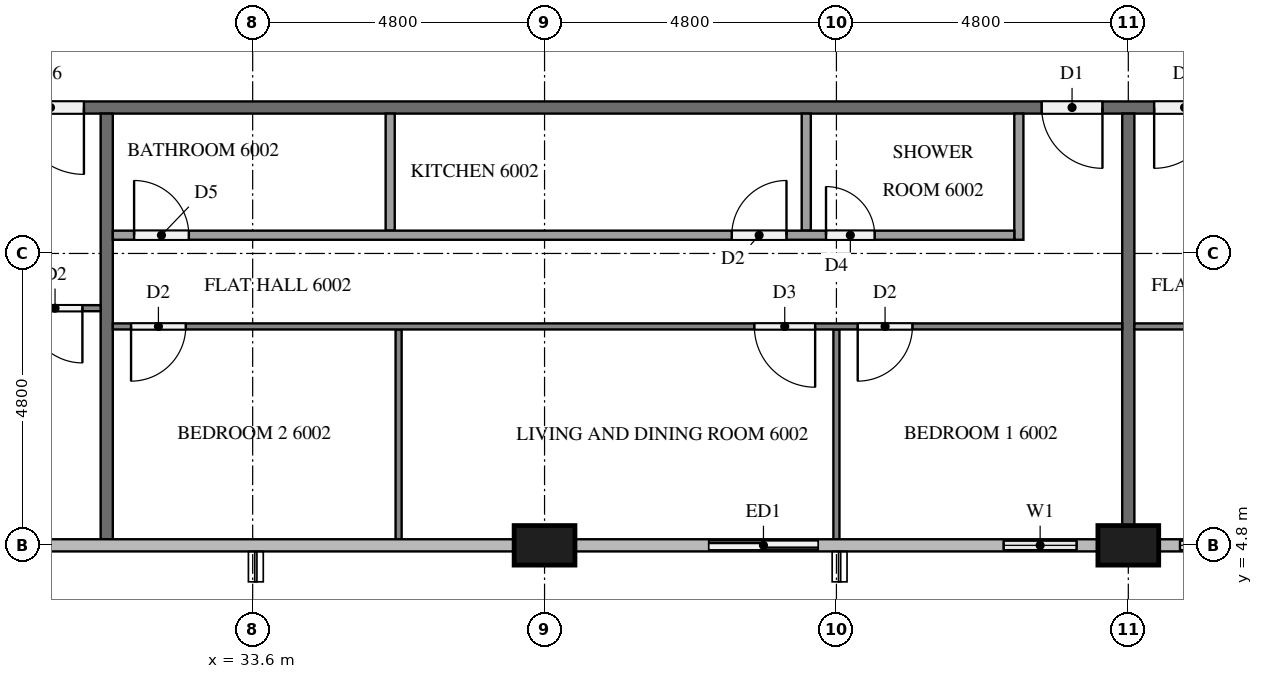
"""IFC4 building model, lengths in metres.
Left out: names, types, materials, properties, quantities, classifications, styles, units other than length and angle.
Written with IfcOpenShell. Run it as: python <this file> out.ifc"""

import sys

from ifc_helpers import new_model, si_unit, direction, frame, frame_2d, origin, origin_2d, place, context, subcontext, project, spatial, rectangle, extrude, element, fill, save


model = new_model("IFC4")
c1 = context("Model", 3, precision=1e-05, world=origin(), true_north=direction((0.0, 1.0)))
c2 = subcontext(c1, "Body", "Model", "MODEL_VIEW")
j1 = project(units=[si_unit("LENGTHUNIT", "METRE"), si_unit("PLANEANGLEUNIT", "RADIAN")], contexts=[c1])
p1 = place(None, origin())
s1 = spatial("IfcSite", under=j1, at=p1, CompositionType="ELEMENT")
p2 = place(p1, origin())
s2 = spatial("IfcBuilding", under=s1, at=p2, CompositionType="ELEMENT")
p3 = place(p2, frame((0.0, 0.0, 229.8)))
s3 = spatial("IfcBuildingStorey", under=s2, at=p3, CompositionType="ELEMENT", Elevation=229.8)
for number, where, z_axis, x_axis in (
    (1, (38.4, 4.8, 0.0), (0.0, 0.0, 1.0), (1.0, 0.0, 0.0)),
    (2, (48.0, 4.8, 0.0), (0.0, 0.0, 1.0), (1.0, 0.0, 0.0)),
):
    element("IfcColumn", number, at=place(p3, frame(where, z_axis=z_axis, x_axis=x_axis)), inside=s3, PredefinedType="COLUMN", context=c2, shape_type="SweptSolid", body=[
        extrude(rectangle(XDim=1.0, YDim=0.65, at=origin_2d()), origin(), (0.0, 0.0, 1.0), 3.1),
    ])
p4 = place(p3, frame((40.8, 4.8, 0.0), z_axis=(0.0, 0.0, 1.0), x_axis=(1.0, 0.0, 0.0)))
e3 = element("IfcWall", 3, at=p4, inside=s3, PredefinedType="SOLIDWALL", context=c2, shape_type="SweptSolid", body=[
    extrude(rectangle(XDim=2.4, YDim=0.15, at=frame_2d((1.2, 0.0))), origin(), (0.0, 0.0, 1.0), 3.1),
])
p5 = place(p4, frame((0.3, 0.0, 0.0)))
e4 = element("IfcOpeningElement", 4, at=p5, cuts=e3, PredefinedType="OPENING", context=c2, shape_type="SweptSolid", body=[
    extrude(rectangle(XDim=1.8, YDim=2.4, at=frame_2d((0.9, 1.2))), frame((0.0, 0.085, 0.0), z_axis=(0.0, -1.0, 0.0), x_axis=(1.0, 0.0, 0.0)), (0.0, 0.0, 1.0), 0.17),
])
p6 = place(p3, frame((45.6, 4.8, 0.0), z_axis=(0.0, 0.0, 1.0), x_axis=(1.0, 0.0, 0.0)))
e5 = element("IfcWall", 5, at=p6, inside=s3, PredefinedType="SOLIDWALL", context=c2, shape_type="SweptSolid", body=[
    extrude(rectangle(XDim=1.9, YDim=0.15, at=frame_2d((0.95, 0.0))), origin(), (0.0, 0.0, 1.0), 3.1),
])
p7 = place(p6, frame((0.35, 0.0, 0.9)))
e6 = element("IfcOpeningElement", 6, at=p7, cuts=e5, PredefinedType="OPENING", context=c2, shape_type="SweptSolid", body=[
    extrude(rectangle(XDim=1.2, YDim=1.4, at=frame_2d((0.6, 0.7))), frame((0.0, 0.085, 0.0), z_axis=(0.0, -1.0, 0.0), x_axis=(1.0, 0.0, 0.0)), (0.0, 0.0, 1.0), 0.17),
])
p8 = place(p3, frame((48.5, 4.8, 0.0), z_axis=(0.0, 0.0, 1.0), x_axis=(1.0, 0.0, 0.0)))
e7 = element("IfcWall", 7, at=p8, inside=s3, PredefinedType="SOLIDWALL", context=c2, shape_type="SweptSolid", body=[
    extrude(rectangle(XDim=1.9, YDim=0.15, at=frame_2d((0.95, 0.0))), origin(), (0.0, 0.0, 1.0), 3.1),
])
p9 = place(p8, frame((0.35, 0.0, 0.9)))
e8 = element("IfcOpeningElement", 8, at=p9, cuts=e7, PredefinedType="OPENING", context=c2, shape_type="SweptSolid", body=[
    extrude(rectangle(XDim=1.2, YDim=1.4, at=frame_2d((0.6, 0.7))), frame((0.0, 0.085, 0.0), z_axis=(0.0, -1.0, 0.0), x_axis=(1.0, 0.0, 0.0)), (0.0, 0.0, 1.0), 0.17),
])
p10 = place(p3, frame((50.5, 12.0, 0.0), z_axis=(0.0, 0.0, 1.0), x_axis=(-1.0, 0.0, 0.0)))
e9 = element("IfcWall", 9, at=p10, inside=s3, PredefinedType="PARTITIONING", context=c2, shape_type="SweptSolid", body=[
    extrude(rectangle(XDim=38.6, YDim=0.2, at=frame_2d((19.3, 0.0))), origin(), (0.0, 0.0, 1.0), 3.1),
])
p11 = place(p10, frame((19.675, 0.0, 0.0)))
e10 = element("IfcOpeningElement", 10, at=p11, cuts=e9, PredefinedType="OPENING", context=c2, shape_type="SweptSolid", body=[
    extrude(rectangle(XDim=1.1, YDim=2.1, at=frame_2d((0.55, 1.05))), frame((0.0, 0.11, 0.0), z_axis=(0.0, -1.0, 0.0), x_axis=(1.0, 0.0, 0.0)), (0.0, 0.0, 1.0), 0.22),
])
p12 = place(p10, frame((2.925, 0.0, 0.0)))
e11 = element("IfcOpeningElement", 11, at=p12, cuts=e9, PredefinedType="OPENING", context=c2, shape_type="SweptSolid", body=[
    extrude(rectangle(XDim=1.0, YDim=2.1, at=frame_2d((0.5, 1.05))), frame((0.0, 0.11, 0.0), z_axis=(0.0, -1.0, 0.0), x_axis=(1.0, 0.0, 0.0)), (0.0, 0.0, 1.0), 0.22),
])
p13 = place(p10, frame((1.075, 0.0, 0.0)))
e12 = element("IfcOpeningElement", 12, at=p13, cuts=e9, PredefinedType="OPENING", context=c2, shape_type="SweptSolid", body=[
    extrude(rectangle(XDim=1.0, YDim=2.1, at=frame_2d((0.5, 1.05))), frame((0.0, 0.11, 0.0), z_axis=(0.0, -1.0, 0.0), x_axis=(1.0, 0.0, 0.0)), (0.0, 0.0, 1.0), 0.22),
])
p14 = place(p3, frame((31.2, 11.9, 0.0), z_axis=(0.0, 0.0, 1.0), x_axis=(0.0, -1.0, 0.0)))
e13 = element("IfcWall", 13, at=p14, inside=s3, PredefinedType="PARTITIONING", context=c2, shape_type="SweptSolid", body=[
    extrude(rectangle(XDim=7.0, YDim=0.2, at=frame_2d((3.5, 0.0))), origin(), (0.0, 0.0, 1.0), 3.1),
])
p15 = place(p3, frame((48.0, 11.9, 0.0), z_axis=(0.0, 0.0, 1.0), x_axis=(0.0, -1.0, 0.0)))
e14 = element("IfcWall", 14, at=p15, inside=s3, PredefinedType="PARTITIONING", context=c2, shape_type="SweptSolid", body=[
    extrude(rectangle(XDim=6.775, YDim=0.2, at=frame_2d((3.387, 0.0))), origin(), (0.0, 0.0, 1.0), 3.1),
])
p16 = place(p3, frame((31.1, 8.7, 0.0), z_axis=(0.0, 0.0, 1.0), x_axis=(-1.0, 0.0, 0.0)))
e15 = element("IfcWall", 15, at=p16, inside=s3, PredefinedType="PARTITIONING", context=c2, shape_type="SweptSolid", body=[
    extrude(rectangle(XDim=19.0, YDim=0.1, at=frame_2d((9.5, 0.0))), origin(), (0.0, 0.0, 1.0), 3.1),
])
p17 = place(p16, frame((0.3, 0.0, 0.0)))
e16 = element("IfcOpeningElement", 16, at=p17, cuts=e15, PredefinedType="OPENING", context=c2, shape_type="SweptSolid", body=[
    extrude(rectangle(XDim=0.9, YDim=2.1, at=frame_2d((0.45, 1.05))), frame((0.0, 0.06, 0.0), z_axis=(0.0, -1.0, 0.0), x_axis=(1.0, 0.0, 0.0)), (0.0, 0.0, 1.0), 0.12),
])
p18 = place(p16, frame((8.25, 0.0, 0.0)))
e17 = element("IfcOpeningElement", 17, at=p18, cuts=e15, PredefinedType="OPENING", context=c2, shape_type="SweptSolid", body=[
    extrude(rectangle(XDim=0.9, YDim=2.1, at=frame_2d((0.45, 1.05))), frame((0.0, 0.06, 0.0), z_axis=(0.0, -1.0, 0.0), x_axis=(1.0, 0.0, 0.0)), (0.0, 0.0, 1.0), 0.12),
])
p19 = place(p16, frame((9.85, 0.0, 0.0)))
e18 = element("IfcOpeningElement", 18, at=p19, cuts=e15, PredefinedType="OPENING", context=c2, shape_type="SweptSolid", body=[
    extrude(rectangle(XDim=1.0, YDim=2.1, at=frame_2d((0.5, 1.05))), frame((0.0, 0.06, 0.0), z_axis=(0.0, -1.0, 0.0), x_axis=(1.0, 0.0, 0.0)), (0.0, 0.0, 1.0), 0.12),
])
p20 = place(p16, frame((17.8, 0.0, 0.0)))
e19 = element("IfcOpeningElement", 19, at=p20, cuts=e15, PredefinedType="OPENING", context=c2, shape_type="SweptSolid", body=[
    extrude(rectangle(XDim=0.9, YDim=2.1, at=frame_2d((0.45, 1.05))), frame((0.0, 0.06, 0.0), z_axis=(0.0, -1.0, 0.0), x_axis=(1.0, 0.0, 0.0)), (0.0, 0.0, 1.0), 0.12),
])
for number, where, z_axis, x_axis in (
    (20, (43.2, 8.35, 0.0), (0.0, 0.0, 1.0), (0.0, -1.0, 0.0)),
    (21, (36.0, 8.35, 0.0), (0.0, 0.0, 1.0), (0.0, -1.0, 0.0)),
):
    element("IfcWall", number, at=place(p3, frame(where, z_axis=z_axis, x_axis=x_axis)), inside=s3, PredefinedType="PARTITIONING", context=c2, shape_type="SweptSolid", body=[
        extrude(rectangle(XDim=3.45, YDim=0.1, at=frame_2d((1.725, 0.0))), origin(), (0.0, 0.0, 1.0), 3.1),
    ])
p21 = place(p3, frame((47.9, 8.4, 0.0), z_axis=(0.0, 0.0, 1.0), x_axis=(-1.0, 0.0, 0.0)))
e22 = element("IfcWall", 22, at=p21, inside=s3, PredefinedType="PARTITIONING", context=c2, shape_type="SweptSolid", body=[
    extrude(rectangle(XDim=16.6, YDim=0.1, at=frame_2d((8.3, 0.0))), origin(), (0.0, 0.0, 1.0), 3.1),
])
p22 = place(p21, frame((3.45, 0.0, 0.0)))
e23 = element("IfcOpeningElement", 23, at=p22, cuts=e22, PredefinedType="OPENING", context=c2, shape_type="SweptSolid", body=[
    extrude(rectangle(XDim=0.9, YDim=2.1, at=frame_2d((0.45, 1.05))), frame((0.0, 0.06, 0.0), z_axis=(0.0, -1.0, 0.0), x_axis=(1.0, 0.0, 0.0)), (0.0, 0.0, 1.0), 0.12),
])
p23 = place(p21, frame((5.05, 0.0, 0.0)))
e24 = element("IfcOpeningElement", 24, at=p23, cuts=e22, PredefinedType="OPENING", context=c2, shape_type="SweptSolid", body=[
    extrude(rectangle(XDim=1.0, YDim=2.1, at=frame_2d((0.5, 1.05))), frame((0.0, 0.06, 0.0), z_axis=(0.0, -1.0, 0.0), x_axis=(1.0, 0.0, 0.0)), (0.0, 0.0, 1.0), 0.12),
])
p24 = place(p21, frame((15.4, 0.0, 0.0)))
e25 = element("IfcOpeningElement", 25, at=p24, cuts=e22, PredefinedType="OPENING", context=c2, shape_type="SweptSolid", body=[
    extrude(rectangle(XDim=0.9, YDim=2.1, at=frame_2d((0.45, 1.05))), frame((0.0, 0.06, 0.0), z_axis=(0.0, -1.0, 0.0), x_axis=(1.0, 0.0, 0.0)), (0.0, 0.0, 1.0), 0.12),
])
for number, where, z_axis, x_axis in (
    (26, (42.704, 11.9, 0.0), (0.0, 0.0, 1.0), (0.0, -1.0, 0.0)),
    (27, (35.862, 11.9, 0.0), (0.0, 0.0, 1.0), (0.0, -1.0, 0.0)),
):
    element("IfcWall", number, at=place(p3, frame(where, z_axis=z_axis, x_axis=x_axis)), inside=s3, PredefinedType="PARTITIONING", context=c2, shape_type="SweptSolid", body=[
        extrude(rectangle(XDim=1.925, YDim=0.15, at=frame_2d((0.962, 0.0))), origin(), (0.0, 0.0, 1.0), 3.1),
    ])
p25 = place(p3, frame((46.2, 11.9, 0.0), z_axis=(0.0, 0.0, 1.0), x_axis=(0.0, -1.0, 0.0)))
e28 = element("IfcWall", 28, at=p25, inside=s3, PredefinedType="PARTITIONING", context=c2, shape_type="SweptSolid", body=[
    extrude(rectangle(XDim=2.075, YDim=0.15, at=frame_2d((1.038, 0.0))), origin(), (0.0, 0.0, 1.0), 3.1),
])
p26 = place(p3, frame((31.3, 9.9, 0.0), z_axis=(0.0, 0.0, 1.0), x_axis=(1.0, 0.0, 0.0)))
e29 = element("IfcWall", 29, at=p26, inside=s3, PredefinedType="PARTITIONING", context=c2, shape_type="SweptSolid", body=[
    extrude(rectangle(XDim=14.825, YDim=0.15, at=frame_2d((7.413, 0.0))), origin(), (0.0, 0.0, 1.0), 3.1),
])
p27 = place(p26, frame((11.729, 0.0, 0.0)))
e30 = element("IfcOpeningElement", 30, at=p27, cuts=e29, PredefinedType="OPENING", context=c2, shape_type="SweptSolid", body=[
    extrude(rectangle(XDim=0.8, YDim=2.1, at=frame_2d((0.4, 1.05))), frame((0.0, 0.085, 0.0), z_axis=(0.0, -1.0, 0.0), x_axis=(1.0, 0.0, 0.0)), (0.0, 0.0, 1.0), 0.17),
])
p28 = place(p26, frame((10.179, 0.0, 0.0)))
e31 = element("IfcOpeningElement", 31, at=p28, cuts=e29, PredefinedType="OPENING", context=c2, shape_type="SweptSolid", body=[
    extrude(rectangle(XDim=0.9, YDim=2.1, at=frame_2d((0.45, 1.05))), frame((0.0, 0.085, 0.0), z_axis=(0.0, -1.0, 0.0), x_axis=(1.0, 0.0, 0.0)), (0.0, 0.0, 1.0), 0.17),
])
p29 = place(p26, frame((0.35, 0.0, 0.0)))
e32 = element("IfcOpeningElement", 32, at=p29, cuts=e29, PredefinedType="OPENING", context=c2, shape_type="SweptSolid", body=[
    extrude(rectangle(XDim=0.9, YDim=2.1, at=frame_2d((0.45, 1.05))), frame((0.0, 0.085, 0.0), z_axis=(0.0, -1.0, 0.0), x_axis=(1.0, 0.0, 0.0)), (0.0, 0.0, 1.0), 0.17),
])
p30 = place(p3, frame((61.979, 8.4, 0.0), z_axis=(0.0, 0.0, 1.0), x_axis=(-1.0, 0.0, 0.0)))
e33 = element("IfcWall", 33, at=p30, inside=s3, PredefinedType="PARTITIONING", context=c2, shape_type="SweptSolid", body=[
    extrude(rectangle(XDim=13.878, YDim=0.1, at=frame_2d((6.939, 0.0))), origin(), (0.0, 0.0, 1.0), 3.1),
])
p31 = place(p30, frame((9.529, 0.0, 0.0)))
e34 = element("IfcOpeningElement", 34, at=p31, cuts=e33, PredefinedType="OPENING", context=c2, shape_type="SweptSolid", body=[
    extrude(rectangle(XDim=0.9, YDim=2.1, at=frame_2d((0.45, 1.05))), frame((0.0, 0.06, 0.0), z_axis=(0.0, -1.0, 0.0), x_axis=(1.0, 0.0, 0.0)), (0.0, 0.0, 1.0), 0.12),
])
p32 = place(p30, frame((7.928, 0.0, 0.0)))
e35 = element("IfcOpeningElement", 35, at=p32, cuts=e33, PredefinedType="OPENING", context=c2, shape_type="SweptSolid", body=[
    extrude(rectangle(XDim=0.9, YDim=2.1, at=frame_2d((0.45, 1.05))), frame((0.0, 0.06, 0.0), z_axis=(0.0, -1.0, 0.0), x_axis=(1.0, 0.0, 0.0)), (0.0, 0.0, 1.0), 0.12),
])
p33 = place(p30, frame((0.3, 0.0, 0.0)))
e36 = element("IfcOpeningElement", 36, at=p33, cuts=e33, PredefinedType="OPENING", context=c2, shape_type="SweptSolid", body=[
    extrude(rectangle(XDim=1.0, YDim=2.1, at=frame_2d((0.5, 1.05))), frame((0.0, 0.06, 0.0), z_axis=(0.0, -1.0, 0.0), x_axis=(1.0, 0.0, 0.0)), (0.0, 0.0, 1.0), 0.12),
])
p34 = place(p5, origin())
e37 = element("IfcDoor", 37, at=p34, inside=s3, OperationType="SLIDING_TO_LEFT", PredefinedType="DOOR", context=c2, shape_type="SweptSolid", body=[
    extrude(rectangle(XDim=1.8, YDim=2.4, at=frame_2d((0.9, 1.2))), frame((0.0, 0.025, 0.0), z_axis=(0.0, -1.0, 0.0), x_axis=(1.0, 0.0, 0.0)), (0.0, 0.0, 1.0), 0.05),
])
fill(e4, e37)
p35 = place(p7, origin())
e38 = element("IfcWindow", 38, at=p35, inside=s3, PartitioningType="SINGLE_PANEL", PredefinedType="WINDOW", context=c2, shape_type="SweptSolid", body=[
    extrude(rectangle(XDim=1.2, YDim=1.4, at=frame_2d((0.6, 0.7))), frame((0.0, 0.03, 0.0), z_axis=(0.0, -1.0, 0.0), x_axis=(1.0, 0.0, 0.0)), (0.0, 0.0, 1.0), 0.06),
])
fill(e6, e38)
p36 = place(p9, origin())
e39 = element("IfcWindow", 39, at=p36, inside=s3, PartitioningType="SINGLE_PANEL", PredefinedType="WINDOW", context=c2, shape_type="SweptSolid", body=[
    extrude(rectangle(XDim=1.2, YDim=1.4, at=frame_2d((0.6, 0.7))), frame((0.0, 0.03, 0.0), z_axis=(0.0, -1.0, 0.0), x_axis=(1.0, 0.0, 0.0)), (0.0, 0.0, 1.0), 0.06),
])
fill(e8, e39)
p37 = place(p11, origin())
e40 = element("IfcDoor", 40, at=p37, inside=s3, OperationType="SINGLE_SWING_LEFT", PredefinedType="DOOR", context=c2, shape_type="SweptSolid", body=[
    extrude(rectangle(XDim=1.1, YDim=2.1, at=frame_2d((0.55, 1.05))), frame((0.0, 0.025, 0.0), z_axis=(0.0, -1.0, 0.0), x_axis=(1.0, 0.0, 0.0)), (0.0, 0.0, 1.0), 0.05),
])
fill(e10, e40)
p38 = place(p12, origin())
e41 = element("IfcDoor", 41, at=p38, inside=s3, OperationType="SINGLE_SWING_LEFT", PredefinedType="DOOR", context=c2, shape_type="SweptSolid", body=[
    extrude(rectangle(XDim=1.0, YDim=2.1, at=frame_2d((0.5, 1.05))), frame((0.0, 0.025, 0.0), z_axis=(0.0, -1.0, 0.0), x_axis=(1.0, 0.0, 0.0)), (0.0, 0.0, 1.0), 0.05),
])
fill(e11, e41)
p39 = place(p13, origin())
e42 = element("IfcDoor", 42, at=p39, inside=s3, OperationType="SINGLE_SWING_RIGHT", PredefinedType="DOOR", context=c2, shape_type="SweptSolid", body=[
    extrude(rectangle(XDim=1.0, YDim=2.1, at=frame_2d((0.5, 1.05))), frame((0.0, 0.025, 0.0), z_axis=(0.0, -1.0, 0.0), x_axis=(1.0, 0.0, 0.0)), (0.0, 0.0, 1.0), 0.05),
])
fill(e12, e42)
p40 = place(p17, origin())
e43 = element("IfcDoor", 43, at=p40, inside=s3, OperationType="SINGLE_SWING_LEFT", PredefinedType="DOOR", context=c2, shape_type="SweptSolid", body=[
    extrude(rectangle(XDim=0.9, YDim=2.1, at=frame_2d((0.45, 1.05))), frame((0.0, 0.025, 0.0), z_axis=(0.0, -1.0, 0.0), x_axis=(1.0, 0.0, 0.0)), (0.0, 0.0, 1.0), 0.05),
])
fill(e16, e43)
p41 = place(p22, origin())
e44 = element("IfcDoor", 44, at=p41, inside=s3, OperationType="SINGLE_SWING_RIGHT", PredefinedType="DOOR", context=c2, shape_type="SweptSolid", body=[
    extrude(rectangle(XDim=0.9, YDim=2.1, at=frame_2d((0.45, 1.05))), frame((0.0, 0.025, 0.0), z_axis=(0.0, -1.0, 0.0), x_axis=(1.0, 0.0, 0.0)), (0.0, 0.0, 1.0), 0.05),
])
fill(e23, e44)
p42 = place(p23, origin())
e45 = element("IfcDoor", 45, at=p42, inside=s3, OperationType="SINGLE_SWING_LEFT", PredefinedType="DOOR", context=c2, shape_type="SweptSolid", body=[
    extrude(rectangle(XDim=1.0, YDim=2.1, at=frame_2d((0.5, 1.05))), frame((0.0, 0.025, 0.0), z_axis=(0.0, -1.0, 0.0), x_axis=(1.0, 0.0, 0.0)), (0.0, 0.0, 1.0), 0.05),
])
fill(e24, e45)
p43 = place(p24, origin())
e46 = element("IfcDoor", 46, at=p43, inside=s3, OperationType="SINGLE_SWING_RIGHT", PredefinedType="DOOR", context=c2, shape_type="SweptSolid", body=[
    extrude(rectangle(XDim=0.9, YDim=2.1, at=frame_2d((0.45, 1.05))), frame((0.0, 0.025, 0.0), z_axis=(0.0, -1.0, 0.0), x_axis=(1.0, 0.0, 0.0)), (0.0, 0.0, 1.0), 0.05),
])
fill(e25, e46)
p44 = place(p27, origin())
e47 = element("IfcDoor", 47, at=p44, inside=s3, OperationType="SINGLE_SWING_LEFT", PredefinedType="DOOR", context=c2, shape_type="SweptSolid", body=[
    extrude(rectangle(XDim=0.8, YDim=2.1, at=frame_2d((0.4, 1.05))), frame((0.0, 0.025, 0.0), z_axis=(0.0, -1.0, 0.0), x_axis=(1.0, 0.0, 0.0)), (0.0, 0.0, 1.0), 0.05),
])
fill(e30, e47)
p45 = place(p28, origin())
e48 = element("IfcDoor", 48, at=p45, inside=s3, OperationType="SINGLE_SWING_RIGHT", PredefinedType="DOOR", context=c2, shape_type="SweptSolid", body=[
    extrude(rectangle(XDim=0.9, YDim=2.1, at=frame_2d((0.45, 1.05))), frame((0.0, 0.025, 0.0), z_axis=(0.0, -1.0, 0.0), x_axis=(1.0, 0.0, 0.0)), (0.0, 0.0, 1.0), 0.05),
])
fill(e31, e48)
p46 = place(p29, origin())
e49 = element("IfcDoor", 49, at=p46, inside=s3, OperationType="SINGLE_SWING_LEFT", PredefinedType="DOOR", context=c2, shape_type="SweptSolid", body=[
    extrude(rectangle(XDim=0.9, YDim=2.1, at=frame_2d((0.45, 1.05))), frame((0.0, 0.025, 0.0), z_axis=(0.0, -1.0, 0.0), x_axis=(1.0, 0.0, 0.0)), (0.0, 0.0, 1.0), 0.05),
])
fill(e32, e49)
save(model, sys.argv[1])
